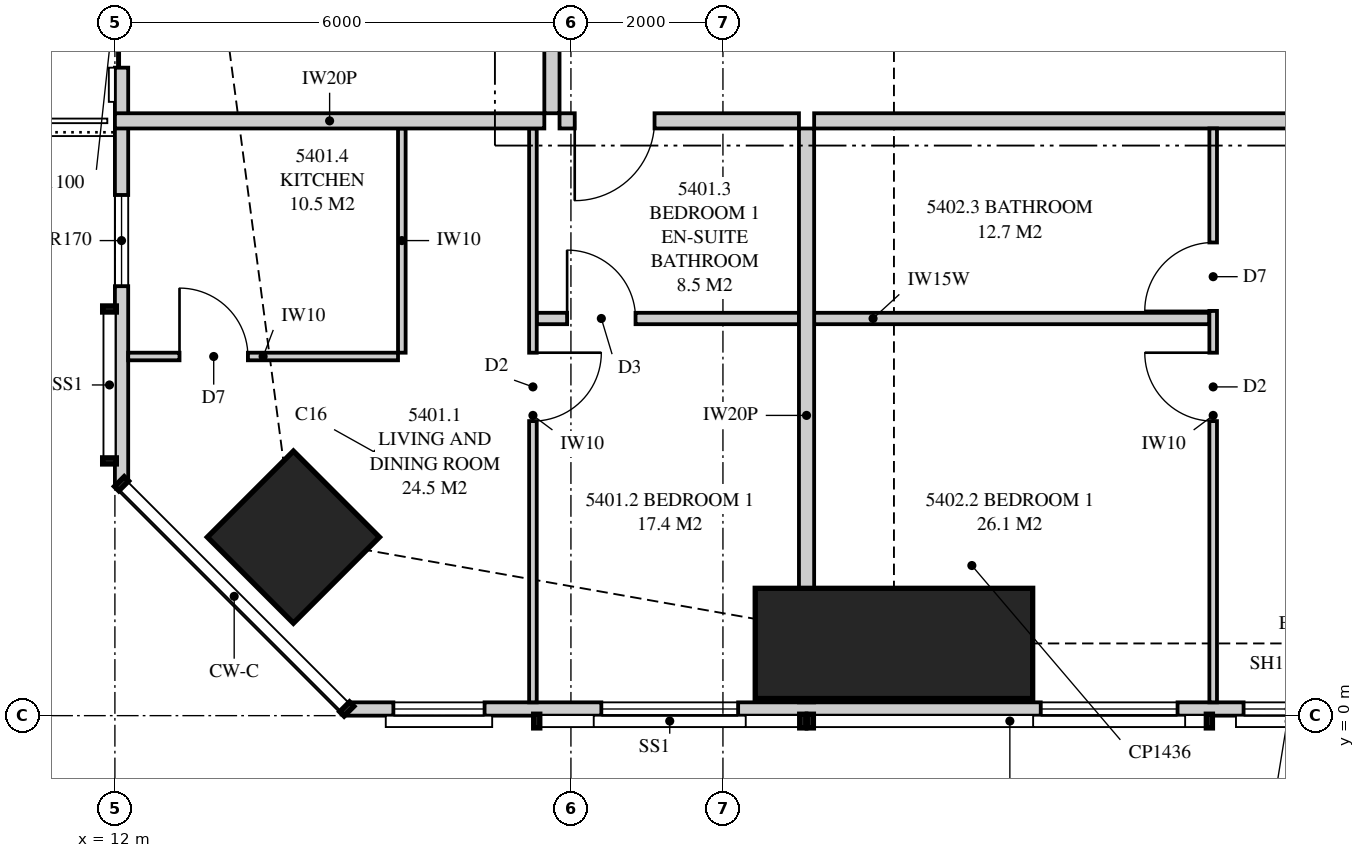
"""IFC4 building model, lengths in metres.
Left out: names, types, materials, properties, quantities, classifications, styles, units other than length and angle.
Written with IfcOpenShell. Run it as: python <this file> out.ifc"""

import sys

from ifc_helpers import new_model, si_unit, direction, frame, frame_2d, origin, origin_2d, place, context, subcontext, project, spatial, polyline, rectangle, outline, extrude, element, fill, save


model = new_model("IFC4")
c1 = context("Model", 3, precision=1e-05, world=origin(), true_north=direction((0.0, 1.0)))
c2 = subcontext(c1, "Body", "Model", "MODEL_VIEW")
j1 = project(units=[si_unit("LENGTHUNIT", "METRE"), si_unit("PLANEANGLEUNIT", "RADIAN")], contexts=[c1])
p1 = place(None, origin())
s1 = spatial("IfcSite", under=j1, at=p1, CompositionType="ELEMENT")
p2 = place(p1, origin())
s2 = spatial("IfcBuilding", under=s1, at=p2, CompositionType="ELEMENT")
p3 = place(p2, frame((0.0, 0.0, 197.9)))
s3 = spatial("IfcBuildingStorey", under=s2, at=p3, CompositionType="ELEMENT", Elevation=197.9)
p4 = place(p3, frame((14.348, 2.348, 0.0), z_axis=(0.0, 0.0, 1.0), x_axis=(0.707106781187, 0.707106781187, 0.0)))
e1 = element("IfcColumn", 1, at=p4, inside=s3, PredefinedType="COLUMN", context=c2, shape_type="SweptSolid", body=[
    extrude(rectangle(XDim=1.6, YDim=1.6, at=origin_2d()), origin(), (0.0, 0.0, 1.0), 3.35),
])
p5 = place(p3, frame((22.25, 0.95, 0.0), z_axis=(0.0, 0.0, 1.0), x_axis=(0.0, 1.0, 0.0)))
e2 = element("IfcColumn", 2, at=p5, inside=s3, PredefinedType="COLUMN", context=c2, shape_type="SweptSolid", body=[
    extrude(rectangle(XDim=1.45, YDim=3.65, at=origin_2d()), origin(), (0.0, 0.0, 1.0), 3.35),
])
p6 = place(p3, frame((15.051, 0.087, 0.0), z_axis=(0.0, 0.0, 1.0), x_axis=(1.0, 0.0, 0.0)))
e3 = element("IfcWall", 3, at=p6, inside=s3, PredefinedType="SOLIDWALL", context=c2, shape_type="SweptSolid", body=[
    extrude(outline(polyline([(0.0, 0.0), (34.897, 0.0), (34.897, 3.11), (27.91, 3.11), (27.91, 2.15), (27.836, 2.15), (27.836, 3.11), (27.699, 3.11), (27.699, 2.15), (7.199, 2.15), (7.199, 3.11), (7.062, 3.11), (7.062, 2.15), (6.987, 2.15), (6.987, 3.11), (0.0, 3.11), (0.0, 0.0)])), frame((0.0, 0.087, 0.0), z_axis=(0.0, -1.0, 0.0), x_axis=(1.0, 0.0, 0.0)), (0.0, 0.0, 1.0), 0.175),
])
p7 = place(p6, frame((0.613, 0.0, 0.4)))
e4 = element("IfcOpeningElement", 4, at=p7, cuts=e3, PredefinedType="OPENING", context=c2, shape_type="SweptSolid", body=[
    extrude(rectangle(XDim=1.2, YDim=1.7, at=frame_2d((0.6, 0.85))), frame((0.0, 0.097, 0.0), z_axis=(0.0, -1.0, 0.0), x_axis=(1.0, 0.0, 0.0)), (0.0, 0.0, 1.0), 0.195),
])
p8 = place(p6, frame((3.349, 0.0, 0.4)))
e5 = element("IfcOpeningElement", 5, at=p8, cuts=e3, PredefinedType="OPENING", context=c2, shape_type="SweptSolid", body=[
    extrude(rectangle(XDim=1.8, YDim=1.7, at=frame_2d((0.9, 0.85))), frame((0.0, 0.097, 0.0), z_axis=(0.0, -1.0, 0.0), x_axis=(1.0, 0.0, 0.0)), (0.0, 0.0, 1.0), 0.195),
])
p9 = place(p6, frame((9.13, 0.0, 0.4)))
e6 = element("IfcOpeningElement", 6, at=p9, cuts=e3, PredefinedType="OPENING", context=c2, shape_type="SweptSolid", body=[
    extrude(rectangle(XDim=1.8, YDim=1.7, at=frame_2d((0.9, 0.85))), frame((0.0, 0.097, 0.0), z_axis=(0.0, -1.0, 0.0), x_axis=(1.0, 0.0, 0.0)), (0.0, 0.0, 1.0), 0.195),
])
p10 = place(p6, frame((13.561, 0.0, 0.0)))
e7 = element("IfcOpeningElement", 7, at=p10, cuts=e3, PredefinedType="OPENING", context=c2, shape_type="SweptSolid", body=[
    extrude(rectangle(XDim=1.8, YDim=2.1, at=frame_2d((0.9, 1.05))), frame((0.0, 0.097, 0.0), z_axis=(0.0, -1.0, 0.0), x_axis=(1.0, 0.0, 0.0)), (0.0, 0.0, 1.0), 0.195),
])
p11 = place(p6, frame((11.799, 0.0, 0.4)))
e8 = element("IfcOpeningElement", 8, at=p11, cuts=e3, PredefinedType="OPENING", context=c2, shape_type="SweptSolid", body=[
    extrude(rectangle(XDim=1.2, YDim=1.7, at=frame_2d((0.6, 0.85))), frame((0.0, 0.097, 0.0), z_axis=(0.0, -1.0, 0.0), x_axis=(1.0, 0.0, 0.0)), (0.0, 0.0, 1.0), 0.195),
])
p12 = place(p6, frame((19.949, 0.0, 0.4)))
e9 = element("IfcOpeningElement", 9, at=p12, cuts=e3, PredefinedType="OPENING", context=c2, shape_type="SweptSolid", body=[
    extrude(rectangle(XDim=1.8, YDim=1.7, at=frame_2d((0.9, 0.85))), frame((0.0, 0.097, 0.0), z_axis=(0.0, -1.0, 0.0), x_axis=(1.0, 0.0, 0.0)), (0.0, 0.0, 1.0), 0.195),
])
p13 = place(p6, frame((23.549, 0.0, 0.4)))
e10 = element("IfcOpeningElement", 10, at=p13, cuts=e3, PredefinedType="OPENING", context=c2, shape_type="SweptSolid", body=[
    extrude(rectangle(XDim=1.8, YDim=1.7, at=frame_2d((0.9, 0.85))), frame((0.0, 0.097, 0.0), z_axis=(0.0, -1.0, 0.0), x_axis=(1.0, 0.0, 0.0)), (0.0, 0.0, 1.0), 0.195),
])
p14 = place(p6, frame((29.73, 0.0, 0.4)))
e11 = element("IfcOpeningElement", 11, at=p14, cuts=e3, PredefinedType="OPENING", context=c2, shape_type="SweptSolid", body=[
    extrude(rectangle(XDim=2.4, YDim=1.7, at=frame_2d((1.2, 0.85))), frame((0.0, 0.097, 0.0), z_axis=(0.0, -1.0, 0.0), x_axis=(1.0, 0.0, 0.0)), (0.0, 0.0, 1.0), 0.195),
])
p15 = place(p3, frame((12.087, 32.949, 0.0), z_axis=(0.0, 0.0, 1.0), x_axis=(0.0, -1.0, 0.0)))
e12 = element("IfcWall", 12, at=p15, inside=s3, PredefinedType="SOLIDWALL", context=c2, shape_type="SweptSolid", body=[
    extrude(outline(polyline([(0.0, 0.0), (29.897, 0.0), (29.897, 3.11), (20.191, 3.11), (20.191, 2.15), (20.051, 2.15), (20.051, 3.11), (19.949, 3.11), (19.949, 2.15), (7.949, 2.15), (7.949, 3.11), (7.823, 3.11), (7.823, 2.15), (7.73, 2.15), (7.73, 3.11), (0.0, 3.11), (0.0, 0.0)])), frame((0.0, 0.087, 0.0), z_axis=(0.0, -1.0, 0.0), x_axis=(1.0, 0.0, 0.0)), (0.0, 0.0, 1.0), 0.175),
])
p16 = place(p15, frame((1.226, 0.0, 0.4)))
e13 = element("IfcOpeningElement", 13, at=p16, cuts=e12, PredefinedType="OPENING", context=c2, shape_type="SweptSolid", body=[
    extrude(rectangle(XDim=1.8, YDim=1.7, at=frame_2d((0.9, 0.85))), frame((0.0, 0.097, 0.0), z_axis=(0.0, -1.0, 0.0), x_axis=(1.0, 0.0, 0.0)), (0.0, 0.0, 1.0), 0.195),
])
p17 = place(p15, frame((9.899, 0.0, 0.4)))
e14 = element("IfcOpeningElement", 14, at=p17, cuts=e12, PredefinedType="OPENING", context=c2, shape_type="SweptSolid", body=[
    extrude(rectangle(XDim=1.8, YDim=1.7, at=frame_2d((0.9, 0.85))), frame((0.0, 0.097, 0.0), z_axis=(0.0, -1.0, 0.0), x_axis=(1.0, 0.0, 0.0)), (0.0, 0.0, 1.0), 0.195),
])
p18 = place(p15, frame((13.024, 0.0, 0.4)))
e15 = element("IfcOpeningElement", 15, at=p18, cuts=e12, PredefinedType="OPENING", context=c2, shape_type="SweptSolid", body=[
    extrude(rectangle(XDim=1.8, YDim=1.7, at=frame_2d((0.9, 0.85))), frame((0.0, 0.097, 0.0), z_axis=(0.0, -1.0, 0.0), x_axis=(1.0, 0.0, 0.0)), (0.0, 0.0, 1.0), 0.195),
])
p19 = place(p15, frame((16.201, 0.0, 0.4)))
e16 = element("IfcOpeningElement", 16, at=p19, cuts=e12, PredefinedType="OPENING", context=c2, shape_type="SweptSolid", body=[
    extrude(rectangle(XDim=1.8, YDim=1.7, at=frame_2d((0.9, 0.85))), frame((0.0, 0.097, 0.0), z_axis=(0.0, -1.0, 0.0), x_axis=(1.0, 0.0, 0.0)), (0.0, 0.0, 1.0), 0.195),
])
p20 = place(p15, frame((22.624, 0.0, 0.0)))
e17 = element("IfcOpeningElement", 17, at=p20, cuts=e12, PredefinedType="OPENING", context=c2, shape_type="SweptSolid", body=[
    extrude(rectangle(XDim=1.8, YDim=2.1, at=frame_2d((0.9, 1.05))), frame((0.0, 0.097, 0.0), z_axis=(0.0, -1.0, 0.0), x_axis=(1.0, 0.0, 0.0)), (0.0, 0.0, 1.0), 0.195),
])
p21 = place(p15, frame((26.099, 0.0, 0.4)))
e18 = element("IfcOpeningElement", 18, at=p21, cuts=e12, PredefinedType="OPENING", context=c2, shape_type="SweptSolid", body=[
    extrude(rectangle(XDim=1.2, YDim=1.7, at=frame_2d((0.6, 0.85))), frame((0.0, 0.097, 0.0), z_axis=(0.0, -1.0, 0.0), x_axis=(1.0, 0.0, 0.0)), (0.0, 0.0, 1.0), 0.195),
])
p22 = place(p3, frame((21.1, 0.175, 0.0), z_axis=(0.0, 0.0, 1.0), x_axis=(0.0, 1.0, 0.0)))
e19 = element("IfcWall", 19, at=p22, inside=s3, PredefinedType="PARTITIONING", context=c2, shape_type="SweptSolid", body=[
    extrude(outline(polyline([(0.054, 3.11), (0.0, 3.11), (0.0, 0.0), (0.529, 0.0), (0.529, 0.362), (1.021, 0.362), (1.021, 0.0), (7.55, 0.0), (7.55, 3.11), (1.903, 3.11), (1.903, 2.15), (1.021, 2.15), (1.021, 1.788), (0.529, 1.788), (0.529, 2.15), (0.054, 2.15), (0.054, 3.11)])), frame((0.0, 0.1, 0.0), z_axis=(0.0, -1.0, 0.0), x_axis=(1.0, 0.0, 0.0)), (0.0, 0.0, 1.0), 0.2),
])
p23 = place(p3, frame((17.85, 7.825, 0.0), z_axis=(0.0, 0.0, 1.0), x_axis=(1.0, 0.0, 0.0)))
e20 = element("IfcWall", 20, at=p23, inside=s3, PredefinedType="PARTITIONING", context=c2, shape_type="SweptSolid", body=[
    extrude(rectangle(XDim=3.15, YDim=0.2, at=frame_2d((1.575, 0.0))), origin(), (0.0, 0.0, 1.0), 3.11),
])
p24 = place(p23, frame((0.2, 0.0, 0.0)))
e21 = element("IfcOpeningElement", 21, at=p24, cuts=e20, PredefinedType="OPENING", context=c2, shape_type="SweptSolid", body=[
    extrude(rectangle(XDim=1.05, YDim=2.2, at=frame_2d((0.525, 1.1))), frame((0.0, 0.11, 0.0), z_axis=(0.0, -1.0, 0.0), x_axis=(1.0, 0.0, 0.0)), (0.0, 0.0, 1.0), 0.22),
])
p25 = place(p3, frame((17.5, 0.175, 0.0), z_axis=(0.0, 0.0, 1.0), x_axis=(0.0, 1.0, 0.0)))
e22 = element("IfcWall", 22, at=p25, inside=s3, PredefinedType="PARTITIONING", context=c2, shape_type="SweptSolid", body=[
    extrude(outline(polyline([(0.0, 0.0), (7.55, 0.0), (7.55, 3.11), (2.489, 3.11), (2.489, 2.15), (0.742, 2.15), (0.742, 3.11), (0.0, 3.11), (0.0, 0.0)])), frame((0.0, 0.05, 0.0), z_axis=(0.0, -1.0, 0.0), x_axis=(1.0, 0.0, 0.0)), (0.0, 0.0, 1.0), 0.1),
])
p26 = place(p25, frame((3.7, 0.0, 0.0)))
e23 = element("IfcOpeningElement", 23, at=p26, cuts=e22, PredefinedType="OPENING", context=c2, shape_type="SweptSolid", body=[
    extrude(rectangle(XDim=0.9, YDim=2.1, at=frame_2d((0.45, 1.05))), frame((0.0, 0.06, 0.0), z_axis=(0.0, -1.0, 0.0), x_axis=(1.0, 0.0, 0.0)), (0.0, 0.0, 1.0), 0.12),
])
p27 = place(p3, frame((17.55, 5.225, 0.0), z_axis=(0.0, 0.0, 1.0), x_axis=(1.0, 0.0, 0.0)))
e24 = element("IfcWall", 24, at=p27, inside=s3, PredefinedType="PLUMBINGWALL", context=c2, shape_type="SweptSolid", body=[
    extrude(rectangle(XDim=3.45, YDim=0.15, at=frame_2d((1.725, 0.0))), origin(), (0.0, 0.0, 1.0), 3.11),
])
p28 = place(p27, frame((0.4, 0.0, 0.0)))
e25 = element("IfcOpeningElement", 25, at=p28, cuts=e24, PredefinedType="OPENING", context=c2, shape_type="SweptSolid", body=[
    extrude(rectangle(XDim=0.9, YDim=2.1, at=frame_2d((0.45, 1.05))), frame((0.0, 0.085, 0.0), z_axis=(0.0, -1.0, 0.0), x_axis=(1.0, 0.0, 0.0)), (0.0, 0.0, 1.0), 0.17),
])
p29 = place(p3, frame((12.175, 4.725, 0.0), z_axis=(0.0, 0.0, 1.0), x_axis=(1.0, 0.0, 0.0)))
e26 = element("IfcWall", 26, at=p29, inside=s3, PredefinedType="PARTITIONING", context=c2, shape_type="SweptSolid", body=[
    extrude(outline(polyline([(0.0, 0.0), (3.55, 0.0), (3.55, 3.11), (2.729, 3.11), (2.729, 2.15), (0.994, 2.15), (0.994, 3.11), (0.0, 3.11), (0.0, 0.0)])), frame((0.0, 0.05, 0.0), z_axis=(0.0, -1.0, 0.0), x_axis=(1.0, 0.0, 0.0)), (0.0, 0.0, 1.0), 0.1),
])
p30 = place(p29, frame((0.675, 0.0, 0.0)))
e27 = element("IfcOpeningElement", 27, at=p30, cuts=e26, PredefinedType="OPENING", context=c2, shape_type="SweptSolid", body=[
    extrude(rectangle(XDim=0.9, YDim=2.1, at=frame_2d((0.45, 1.05))), frame((0.0, 0.06, 0.0), z_axis=(0.0, -1.0, 0.0), x_axis=(1.0, 0.0, 0.0)), (0.0, 0.0, 1.0), 0.12),
])
p31 = place(p3, frame((15.775, 4.775, 0.0), z_axis=(0.0, 0.0, 1.0), x_axis=(0.0, 1.0, 0.0)))
e28 = element("IfcWall", 28, at=p31, inside=s3, PredefinedType="PARTITIONING", context=c2, shape_type="SweptSolid", body=[
    extrude(rectangle(XDim=2.95, YDim=0.1, at=frame_2d((1.475, 0.0))), origin(), (0.0, 0.0, 1.0), 3.11),
])
p32 = place(p3, frame((21.2, 7.825, 0.0), z_axis=(0.0, 0.0, 1.0), x_axis=(1.0, 0.0, 0.0)))
e29 = element("IfcWall", 29, at=p32, inside=s3, PredefinedType="PARTITIONING", context=c2, shape_type="SweptSolid", body=[
    extrude(outline(polyline([(0.0, 0.0), (8.6, 0.0), (8.6, 3.11), (1.387, 3.11), (1.387, 2.541), (0.713, 2.541), (0.713, 3.11), (0.0, 3.11), (0.0, 0.0)])), frame((0.0, 0.1, 0.0), z_axis=(0.0, -1.0, 0.0), x_axis=(1.0, 0.0, 0.0)), (0.0, 0.0, 1.0), 0.2),
])
p33 = place(p3, frame((26.45, 0.175, 0.0), z_axis=(0.0, 0.0, 1.0), x_axis=(0.0, 1.0, 0.0)))
e30 = element("IfcWall", 30, at=p33, inside=s3, PredefinedType="PARTITIONING", context=c2, shape_type="SweptSolid", body=[
    extrude(outline(polyline([(0.0, 0.0), (7.55, 0.0), (7.55, 3.11), (1.635, 3.11), (1.635, 2.15), (0.0, 2.15), (0.0, 3.11), (0.0, 0.0)])), frame((0.0, 0.05, 0.0), z_axis=(0.0, -1.0, 0.0), x_axis=(1.0, 0.0, 0.0)), (0.0, 0.0, 1.0), 0.1),
])
p34 = place(p33, frame((3.7, 0.0, 0.0)))
e31 = element("IfcOpeningElement", 31, at=p34, cuts=e30, PredefinedType="OPENING", context=c2, shape_type="SweptSolid", body=[
    extrude(rectangle(XDim=0.9, YDim=2.1, at=frame_2d((0.45, 1.05))), frame((0.0, 0.06, 0.0), z_axis=(0.0, -1.0, 0.0), x_axis=(1.0, 0.0, 0.0)), (0.0, 0.0, 1.0), 0.12),
])
p35 = place(p33, frame((5.15, 0.0, 0.0)))
e32 = element("IfcOpeningElement", 32, at=p35, cuts=e30, PredefinedType="OPENING", context=c2, shape_type="SweptSolid", body=[
    extrude(rectangle(XDim=0.9, YDim=2.1, at=frame_2d((0.45, 1.05))), frame((0.0, 0.06, 0.0), z_axis=(0.0, -1.0, 0.0), x_axis=(1.0, 0.0, 0.0)), (0.0, 0.0, 1.0), 0.12),
])
p36 = place(p3, frame((21.2, 5.225, 0.0), z_axis=(0.0, 0.0, 1.0), x_axis=(1.0, 0.0, 0.0)))
e33 = element("IfcWall", 33, at=p36, inside=s3, PredefinedType="PLUMBINGWALL", context=c2, shape_type="SweptSolid", body=[
    extrude(outline(polyline([(0.0, 0.0), (5.2, 0.0), (5.2, 3.11), (1.362, 3.11), (1.362, 2.541), (0.738, 2.541), (0.738, 3.11), (0.0, 3.11), (0.0, 0.0)])), frame((0.0, 0.075, 0.0), z_axis=(0.0, -1.0, 0.0), x_axis=(1.0, 0.0, 0.0)), (0.0, 0.0, 1.0), 0.15),
])
p37 = place(p3, frame((12.0, 7.825, 0.0), z_axis=(0.0, 0.0, 1.0), x_axis=(1.0, 0.0, 0.0)))
e34 = element("IfcWall", 34, at=p37, inside=s3, PredefinedType="PARTITIONING", context=c2, shape_type="SweptSolid", body=[
    extrude(outline(polyline([(0.0, 0.0), (5.65, 0.0), (5.65, 3.11), (2.547, 3.11), (2.547, 2.15), (0.712, 2.15), (0.712, 3.11), (0.0, 3.11), (0.0, 0.0)])), frame((0.0, 0.1, 0.0), z_axis=(0.0, -1.0, 0.0), x_axis=(1.0, 0.0, 0.0)), (0.0, 0.0, 1.0), 0.2),
])
p38 = place(p3, frame((17.75, 7.925, 0.0), z_axis=(0.0, 0.0, 1.0), x_axis=(0.0, 1.0, 0.0)))
e35 = element("IfcWall", 35, at=p38, inside=s3, PredefinedType="PARTITIONING", context=c2, shape_type="SweptSolid", body=[
    extrude(outline(polyline([(0.0, 0.0), (21.15, 0.0), (21.15, 3.11), (17.412, 3.11), (17.412, 2.541), (16.738, 2.541), (16.738, 3.11), (5.412, 3.11), (5.412, 2.541), (4.738, 2.541), (4.738, 3.11), (0.0, 3.11), (0.0, 0.0)])), frame((0.0, 0.1, 0.0), z_axis=(0.0, -1.0, 0.0), x_axis=(1.0, 0.0, 0.0)), (0.0, 0.0, 1.0), 0.2),
])
p39 = place(p38, frame((16.25, 0.0, 0.0)))
e36 = element("IfcOpeningElement", 36, at=p39, cuts=e35, PredefinedType="OPENING", context=c2, shape_type="SweptSolid", body=[
    extrude(rectangle(XDim=1.05, YDim=2.2, at=frame_2d((0.525, 1.1))), frame((0.0, 0.11, 0.0), z_axis=(0.0, -1.0, 0.0), x_axis=(1.0, 0.0, 0.0)), (0.0, 0.0, 1.0), 0.22),
])
p40 = place(p7, origin())
e37 = element("IfcWindow", 37, at=p40, inside=s3, PartitioningType="SINGLE_PANEL", PredefinedType="WINDOW", context=c2, shape_type="SweptSolid", body=[
    extrude(rectangle(XDim=1.2, YDim=1.7, at=frame_2d((0.6, 0.85))), frame((0.0, 0.03, 0.0), z_axis=(0.0, -1.0, 0.0), x_axis=(1.0, 0.0, 0.0)), (0.0, 0.0, 1.0), 0.06),
])
fill(e4, e37)
p41 = place(p8, origin())
e38 = element("IfcWindow", 38, at=p41, inside=s3, PartitioningType="SINGLE_PANEL", PredefinedType="WINDOW", context=c2, shape_type="SweptSolid", body=[
    extrude(rectangle(XDim=1.8, YDim=1.7, at=frame_2d((0.9, 0.85))), frame((0.0, 0.03, 0.0), z_axis=(0.0, -1.0, 0.0), x_axis=(1.0, 0.0, 0.0)), (0.0, 0.0, 1.0), 0.06),
])
fill(e5, e38)
p42 = place(p9, origin())
e39 = element("IfcWindow", 39, at=p42, inside=s3, PartitioningType="SINGLE_PANEL", PredefinedType="WINDOW", context=c2, shape_type="SweptSolid", body=[
    extrude(rectangle(XDim=1.8, YDim=1.7, at=frame_2d((0.9, 0.85))), frame((0.0, 0.03, 0.0), z_axis=(0.0, -1.0, 0.0), x_axis=(1.0, 0.0, 0.0)), (0.0, 0.0, 1.0), 0.06),
])
fill(e6, e39)
p43 = place(p11, origin())
e40 = element("IfcWindow", 40, at=p43, inside=s3, PartitioningType="SINGLE_PANEL", PredefinedType="WINDOW", context=c2, shape_type="SweptSolid", body=[
    extrude(rectangle(XDim=1.2, YDim=1.7, at=frame_2d((0.6, 0.85))), frame((0.0, 0.03, 0.0), z_axis=(0.0, -1.0, 0.0), x_axis=(1.0, 0.0, 0.0)), (0.0, 0.0, 1.0), 0.06),
])
fill(e8, e40)
p44 = place(p20, origin())
e41 = element("IfcDoor", 41, at=p44, inside=s3, OperationType="SLIDING_TO_LEFT", PredefinedType="DOOR", context=c2, shape_type="SweptSolid", body=[
    extrude(rectangle(XDim=1.8, YDim=2.1, at=frame_2d((0.9, 1.05))), frame((0.0, 0.025, 0.0), z_axis=(0.0, -1.0, 0.0), x_axis=(1.0, 0.0, 0.0)), (0.0, 0.0, 1.0), 0.05),
])
fill(e17, e41)
p45 = place(p21, origin())
e42 = element("IfcWindow", 42, at=p45, inside=s3, PartitioningType="SINGLE_PANEL", PredefinedType="WINDOW", context=c2, shape_type="SweptSolid", body=[
    extrude(rectangle(XDim=1.2, YDim=1.7, at=frame_2d((0.6, 0.85))), frame((0.0, 0.03, 0.0), z_axis=(0.0, -1.0, 0.0), x_axis=(1.0, 0.0, 0.0)), (0.0, 0.0, 1.0), 0.06),
])
fill(e18, e42)
p46 = place(p24, frame((1.05, 0.0, 0.0), z_axis=(0.0, 0.0, 1.0), x_axis=(-1.0, 0.0, 0.0)))
e43 = element("IfcDoor", 43, at=p46, inside=s3, OperationType="SINGLE_SWING_RIGHT", PredefinedType="DOOR", context=c2, shape_type="SweptSolid", body=[
    extrude(rectangle(XDim=1.05, YDim=2.2, at=frame_2d((0.525, 1.1))), frame((0.0, 0.025, 0.0), z_axis=(0.0, -1.0, 0.0), x_axis=(1.0, 0.0, 0.0)), (0.0, 0.0, 1.0), 0.05),
])
fill(e21, e43)
p47 = place(p26, frame((0.9, 0.0, 0.0), z_axis=(0.0, 0.0, 1.0), x_axis=(-1.0, 0.0, 0.0)))
e44 = element("IfcDoor", 44, at=p47, inside=s3, OperationType="SINGLE_SWING_LEFT", PredefinedType="DOOR", context=c2, shape_type="SweptSolid", body=[
    extrude(rectangle(XDim=0.9, YDim=2.1, at=frame_2d((0.45, 1.05))), frame((0.0, 0.025, 0.0), z_axis=(0.0, -1.0, 0.0), x_axis=(1.0, 0.0, 0.0)), (0.0, 0.0, 1.0), 0.05),
])
fill(e23, e44)
p48 = place(p28, origin())
e45 = element("IfcDoor", 45, at=p48, inside=s3, OperationType="SINGLE_SWING_LEFT", PredefinedType="DOOR", context=c2, shape_type="SweptSolid", body=[
    extrude(rectangle(XDim=0.9, YDim=2.1, at=frame_2d((0.45, 1.05))), frame((0.0, 0.025, 0.0), z_axis=(0.0, -1.0, 0.0), x_axis=(1.0, 0.0, 0.0)), (0.0, 0.0, 1.0), 0.05),
])
fill(e25, e45)
p49 = place(p30, origin())
e46 = element("IfcDoor", 46, at=p49, inside=s3, OperationType="SINGLE_SWING_LEFT", PredefinedType="DOOR", context=c2, shape_type="SweptSolid", body=[
    extrude(rectangle(XDim=0.9, YDim=2.1, at=frame_2d((0.45, 1.05))), frame((0.0, 0.025, 0.0), z_axis=(0.0, -1.0, 0.0), x_axis=(1.0, 0.0, 0.0)), (0.0, 0.0, 1.0), 0.05),
])
fill(e27, e46)
p50 = place(p34, origin())
e47 = element("IfcDoor", 47, at=p50, inside=s3, OperationType="SINGLE_SWING_RIGHT", PredefinedType="DOOR", context=c2, shape_type="SweptSolid", body=[
    extrude(rectangle(XDim=0.9, YDim=2.1, at=frame_2d((0.45, 1.05))), frame((0.0, 0.025, 0.0), z_axis=(0.0, -1.0, 0.0), x_axis=(1.0, 0.0, 0.0)), (0.0, 0.0, 1.0), 0.05),
])
fill(e31, e47)
p51 = place(p35, origin())
e48 = element("IfcDoor", 48, at=p51, inside=s3, OperationType="SINGLE_SWING_LEFT", PredefinedType="DOOR", context=c2, shape_type="SweptSolid", body=[
    extrude(rectangle(XDim=0.9, YDim=2.1, at=frame_2d((0.45, 1.05))), frame((0.0, 0.025, 0.0), z_axis=(0.0, -1.0, 0.0), x_axis=(1.0, 0.0, 0.0)), (0.0, 0.0, 1.0), 0.05),
])
fill(e32, e48)
save(model, sys.argv[1])
